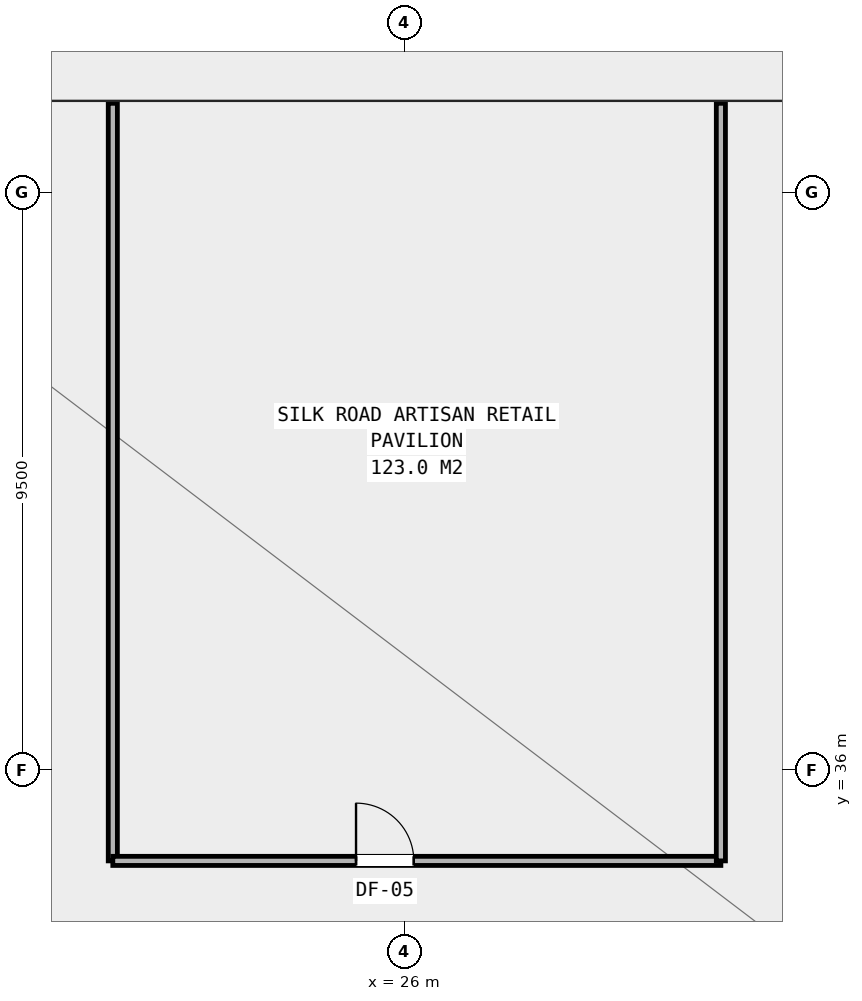
"""IFC4 building model, lengths in metres.
Left out: names, types, materials, properties, quantities, classifications, styles, units other than length and angle.
Written with IfcOpenShell. Run it as: python <this file> out.ifc"""

import sys

from ifc_helpers import new_model, si_unit, direction, frame, frame_2d, origin, place, context, subcontext, project, spatial, rectangle, extrude, element, fill, save


model = new_model("IFC4")
c1 = context("Model", 3, precision=1e-05, world=origin(), true_north=direction((0.0, 1.0)))
c2 = subcontext(c1, "Body", "Model", "MODEL_VIEW")
j1 = project(units=[si_unit("LENGTHUNIT", "METRE"), si_unit("PLANEANGLEUNIT", "RADIAN")], contexts=[c1])
p1 = place(None, origin())
s1 = spatial("IfcSite", under=j1, at=p1, CompositionType="ELEMENT")
p2 = place(p1, origin())
s2 = spatial("IfcBuilding", under=s1, at=p2, CompositionType="ELEMENT")
p3 = place(p2, origin())
s3 = spatial("IfcBuildingStorey", under=s2, at=p3, CompositionType="ELEMENT", Elevation=0.0)
p4 = place(p3, frame((21.2, 34.5, 0.0), z_axis=(0.0, 0.0, 1.0), x_axis=(0.0, 1.0, 0.0)))
e1 = element("IfcWall", 1, at=p4, inside=s3, PredefinedType="PARTITIONING", context=c2, shape_type="SweptSolid", body=[
    extrude(rectangle(XDim=12.46, YDim=0.15, at=frame_2d((6.23, 0.0))), origin(), (0.0, 0.0, 1.0), 4.431),
])
p5 = place(p3, frame((21.2, 34.5, 0.0), z_axis=(0.0, 0.0, 1.0), x_axis=(1.0, 0.0, 0.0)))
e2 = element("IfcWall", 2, at=p5, inside=s3, PredefinedType="PARTITIONING", context=c2, shape_type="SweptSolid", body=[
    extrude(rectangle(XDim=10.0, YDim=0.15, at=frame_2d((5.0, 0.0))), origin(), (0.0, 0.0, 1.0), 4.431),
])
p6 = place(p5, frame((4.0, 0.0, 0.0)))
e3 = element("IfcOpeningElement", 3, at=p6, cuts=e2, PredefinedType="OPENING", context=c2, shape_type="SweptSolid", body=[
    extrude(rectangle(XDim=0.95, YDim=2.1, at=frame_2d((0.475, 1.05))), frame((0.0, 0.085, 0.0), z_axis=(0.0, -1.0, 0.0), x_axis=(1.0, 0.0, 0.0)), (0.0, 0.0, 1.0), 0.17),
])
p7 = place(p3, frame((31.2, 34.5, 0.0), z_axis=(0.0, 0.0, 1.0), x_axis=(0.0, 1.0, 0.0)))
e4 = element("IfcWall", 4, at=p7, inside=s3, PredefinedType="PARTITIONING", context=c2, shape_type="SweptSolid", body=[
    extrude(rectangle(XDim=12.46, YDim=0.15, at=frame_2d((6.23, 0.0))), origin(), (0.0, 0.0, 1.0), 4.431),
])
p8 = place(p6, origin())
e5 = element("IfcDoor", 5, at=p8, inside=s3, OperationType="SINGLE_SWING_LEFT", PredefinedType="DOOR", context=c2, shape_type="SweptSolid", body=[
    extrude(rectangle(XDim=0.95, YDim=2.1, at=frame_2d((0.475, 1.05))), frame((0.0, 0.025, 0.0), z_axis=(0.0, -1.0, 0.0), x_axis=(1.0, 0.0, 0.0)), (0.0, 0.0, 1.0), 0.05),
])
fill(e3, e5)
save(model, sys.argv[1])
